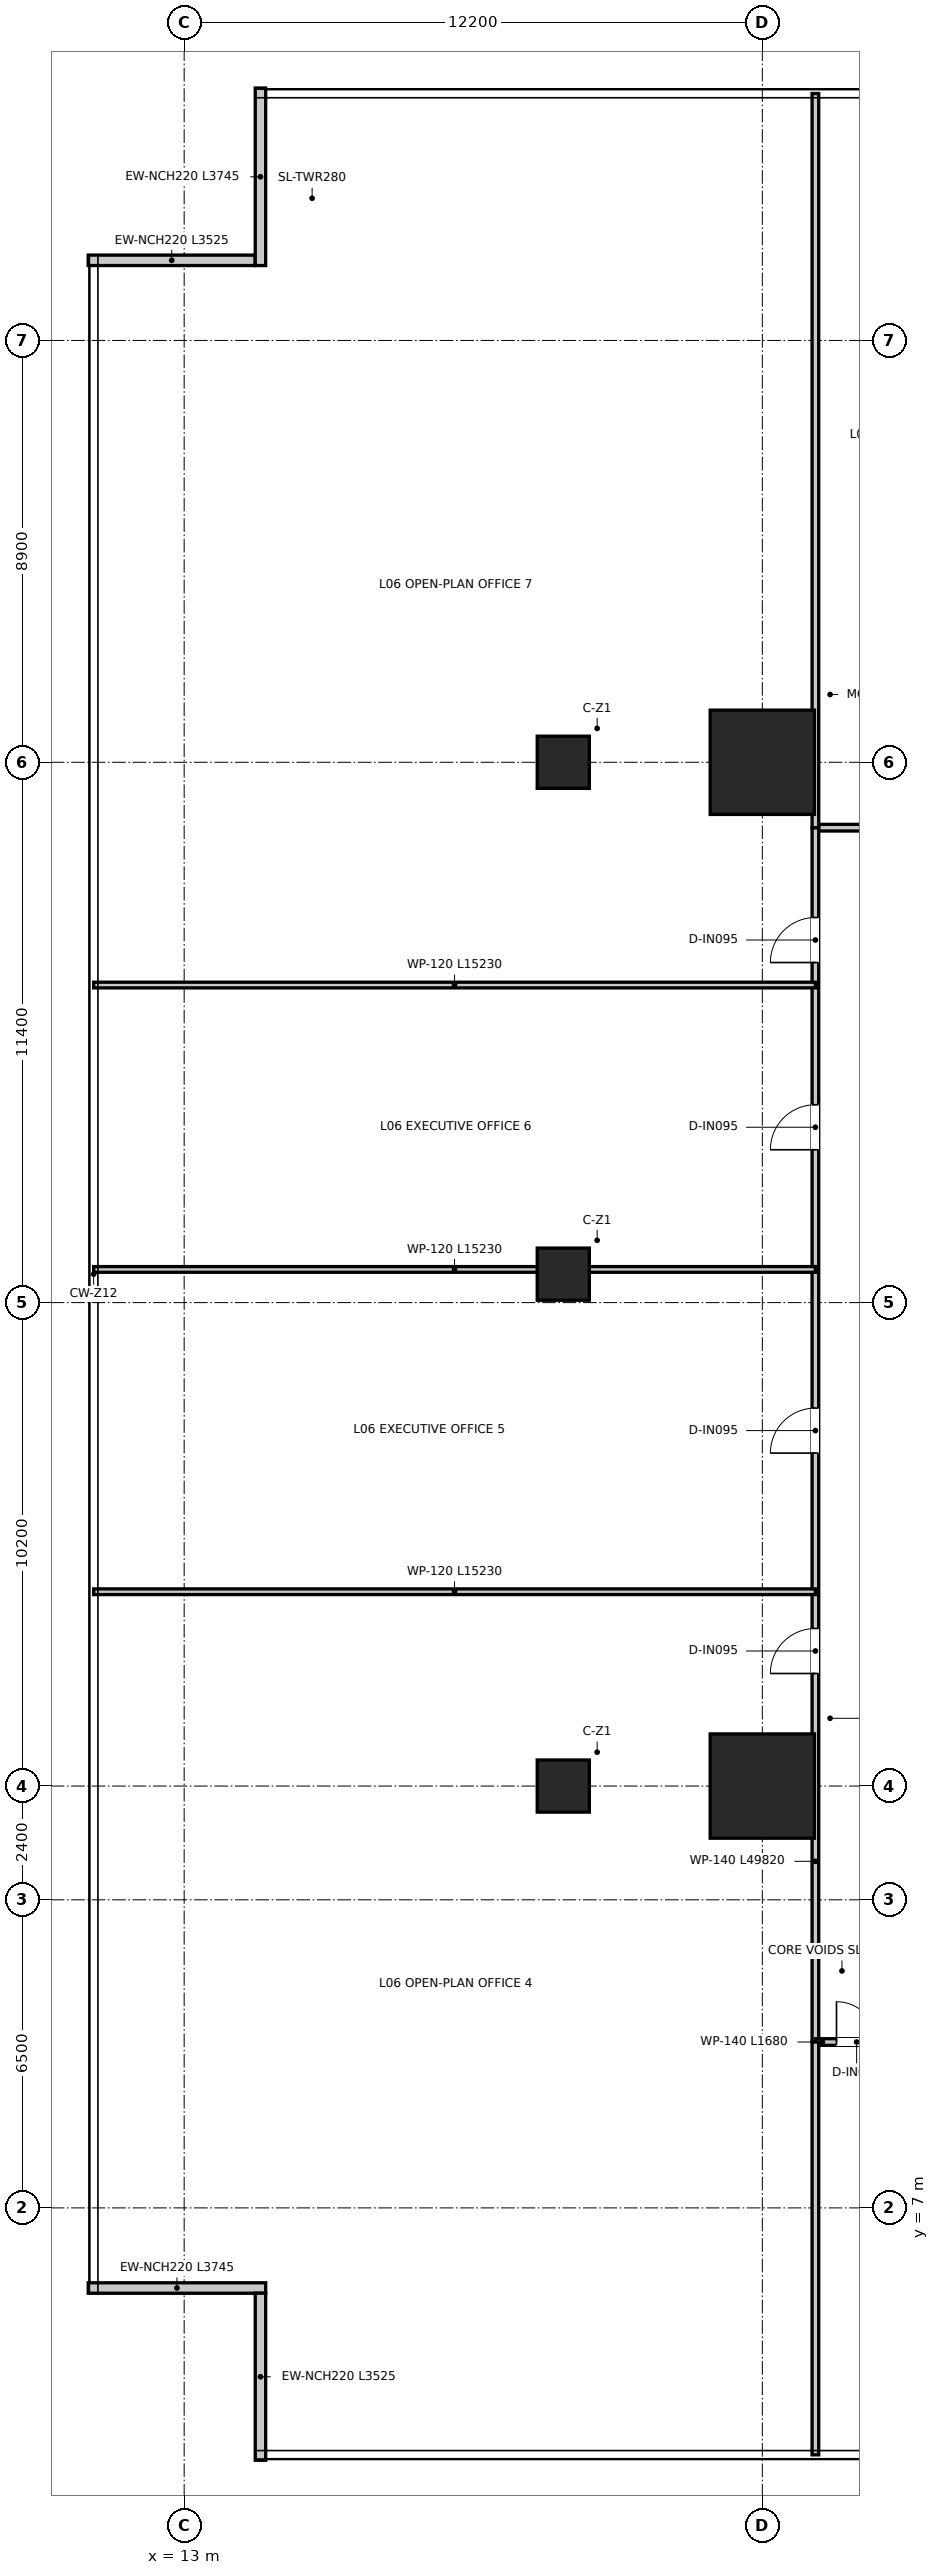
"""IFC4 building model, lengths in metres.
Left out: names, types, materials, properties, quantities, classifications, styles, units other than length and angle.
Written with IfcOpenShell. Run it as: python <this file> out.ifc"""

import sys

from ifc_helpers import new_model, si_unit, direction, frame, frame_2d, origin, origin_2d, place, context, subcontext, project, spatial, rectangle, extrude, source, transform, mapped, element, fill, save


model = new_model("IFC4")
c1 = context("Model", 3, precision=1e-05, world=origin(), true_north=direction((0.0, 1.0)))
c2 = subcontext(c1, "Body", "Model", "MODEL_VIEW")
j1 = project(units=[si_unit("LENGTHUNIT", "METRE"), si_unit("PLANEANGLEUNIT", "RADIAN")], contexts=[c1])
p1 = place(None, origin())
s1 = spatial("IfcSite", under=j1, at=p1, CompositionType="ELEMENT")
p2 = place(p1, origin())
s2 = spatial("IfcBuilding", under=s1, at=p2, CompositionType="ELEMENT")
p3 = place(p2, frame((0.0, 0.0, 28.95)))
s3 = spatial("IfcBuildingStorey", under=s2, at=p3, CompositionType="ELEMENT", Elevation=28.95)
m1 = source(origin(), c2, "Body", "SweptSolid", [
    extrude(rectangle(XDim=2.2, YDim=2.2, at=origin_2d()), origin(), (0.0, 0.0, 1.0), 3.95),
])
for number, where, z_axis, x_axis in (
    (1, (25.2, 15.9, 0.0), (0.0, 0.0, 1.0), (1.0, 0.0, 0.0)),
    (2, (25.2, 37.5, 0.0), (0.0, 0.0, 1.0), (1.0, 0.0, 0.0)),
):
    element("IfcColumn", number, at=place(p3, frame(where, z_axis=z_axis, x_axis=x_axis)), inside=s3, PredefinedType="USERDEFINED", context=c2, shape_type="MappedRepresentation", body=[
        mapped(m1, transform((0.0, 0.0, 0.0), x_axis=(1.0, 0.0, 0.0), y_axis=(0.0, 1.0, 0.0), z_axis=(0.0, 0.0, 1.0), scale=1.0)),
    ])
m2 = source(origin(), c2, "Body", "SweptSolid", [
    extrude(rectangle(XDim=1.1, YDim=1.1, at=origin_2d()), origin(), (0.0, 0.0, 1.0), 3.95),
])
for number, where, z_axis, x_axis in (
    (3, (21.0, 15.9, 0.0), (0.0, 0.0, 1.0), (1.0, 0.0, 0.0)),
    (4, (21.0, 26.7, 0.0), (0.0, 0.0, 1.0), (1.0, 0.0, 0.0)),
    (5, (21.0, 37.5, 0.0), (0.0, 0.0, 1.0), (1.0, 0.0, 0.0)),
):
    element("IfcColumn", number, at=place(p3, frame(where, z_axis=z_axis, x_axis=x_axis)), inside=s3, PredefinedType="COLUMN", context=c2, shape_type="MappedRepresentation", body=[
        mapped(m2, transform((0.0, 0.0, 0.0), x_axis=(1.0, 0.0, 0.0), y_axis=(0.0, 1.0, 0.0), z_axis=(0.0, 0.0, 1.0), scale=1.0)),
    ])
p4 = place(p3, frame((14.5, 48.09, 0.0), z_axis=(0.0, 0.0, 1.0), x_axis=(-1.0, 0.0, 0.0)))
e6 = element("IfcWall", 6, at=p4, inside=s3, PredefinedType="ELEMENTEDWALL", context=c2, shape_type="SweptSolid", body=[
    extrude(rectangle(XDim=3.525, YDim=0.22, at=frame_2d((1.762, 0.0))), origin(), (0.0, 0.0, 1.0), 3.67),
])
p5 = place(p3, frame((10.975, 5.31, 0.0), z_axis=(0.0, 0.0, 1.0), x_axis=(1.0, 0.0, 0.0)))
e7 = element("IfcWall", 7, at=p5, inside=s3, PredefinedType="ELEMENTEDWALL", context=c2, shape_type="SweptSolid", body=[
    extrude(rectangle(XDim=3.745, YDim=0.22, at=frame_2d((1.873, 0.0))), origin(), (0.0, 0.0, 1.0), 3.67),
])
p6 = place(p3, frame((14.61, 5.2, 0.0), z_axis=(0.0, 0.0, 1.0), x_axis=(0.0, -1.0, 0.0)))
e8 = element("IfcWall", 8, at=p6, inside=s3, PredefinedType="ELEMENTEDWALL", context=c2, shape_type="SweptSolid", body=[
    extrude(rectangle(XDim=3.525, YDim=0.22, at=frame_2d((1.762, 0.0))), origin(), (0.0, 0.0, 1.0), 3.67),
])
p7 = place(p3, frame((14.61, 51.725, 0.0), z_axis=(0.0, 0.0, 1.0), x_axis=(0.0, -1.0, 0.0)))
e9 = element("IfcWall", 9, at=p7, inside=s3, PredefinedType="ELEMENTEDWALL", context=c2, shape_type="SweptSolid", body=[
    extrude(rectangle(XDim=3.745, YDim=0.22, at=frame_2d((1.873, 0.0))), origin(), (0.0, 0.0, 1.0), 3.67),
])
p8 = place(p3, frame((26.32, 36.12, 0.0), z_axis=(0.0, 0.0, 1.0), x_axis=(1.0, 0.0, 0.0)))
e10 = element("IfcWall", 10, at=p8, inside=s3, PredefinedType="PARTITIONING", context=c2, shape_type="SweptSolid", body=[
    extrude(rectangle(XDim=19.36, YDim=0.14, at=frame_2d((9.68, 0.0))), origin(), (0.0, 0.0, 1.0), 3.08),
])
p9 = place(p8, frame((2.365, 0.0, 0.0)))
e11 = element("IfcOpeningElement", 11, at=p9, cuts=e10, PredefinedType="OPENING", context=c2, shape_type="SweptSolid", body=[
    extrude(rectangle(XDim=0.95, YDim=2.1, at=frame_2d((0.475, 1.05))), frame((0.0, 0.08, 0.0), z_axis=(0.0, -1.0, 0.0), x_axis=(1.0, 0.0, 0.0)), (0.0, 0.0, 1.0), 0.16),
])
p10 = place(p8, frame((9.205, 0.0, 0.0)))
e12 = element("IfcOpeningElement", 12, at=p10, cuts=e10, PredefinedType="OPENING", context=c2, shape_type="SweptSolid", body=[
    extrude(rectangle(XDim=0.95, YDim=2.1, at=frame_2d((0.475, 1.05))), frame((0.0, 0.08, 0.0), z_axis=(0.0, -1.0, 0.0), x_axis=(1.0, 0.0, 0.0)), (0.0, 0.0, 1.0), 0.16),
])
p11 = place(p8, frame((16.045, 0.0, 0.0)))
e13 = element("IfcOpeningElement", 13, at=p11, cuts=e10, PredefinedType="OPENING", context=c2, shape_type="SweptSolid", body=[
    extrude(rectangle(XDim=0.95, YDim=2.1, at=frame_2d((0.475, 1.05))), frame((0.0, 0.08, 0.0), z_axis=(0.0, -1.0, 0.0), x_axis=(1.0, 0.0, 0.0)), (0.0, 0.0, 1.0), 0.16),
])
p12 = place(p3, frame((26.32, 10.5, 0.0), z_axis=(0.0, 0.0, 1.0), x_axis=(0.0, 1.0, 0.0)))
e14 = element("IfcWall", 14, at=p12, inside=s3, PredefinedType="PARTITIONING", context=c2, shape_type="SweptSolid", body=[
    extrude(rectangle(XDim=25.62, YDim=0.14, at=frame_2d((12.81, 0.0))), origin(), (0.0, 0.0, 1.0), 2.97),
])
p13 = place(p12, frame((7.775, 0.0, 0.0)))
e15 = element("IfcOpeningElement", 15, at=p13, cuts=e14, PredefinedType="OPENING", context=c2, shape_type="SweptSolid", body=[
    extrude(rectangle(XDim=0.95, YDim=2.1, at=frame_2d((0.475, 1.05))), frame((0.0, 0.08, 0.0), z_axis=(0.0, -1.0, 0.0), x_axis=(1.0, 0.0, 0.0)), (0.0, 0.0, 1.0), 0.16),
])
p14 = place(p12, frame((12.425, 0.0, 0.0)))
e16 = element("IfcOpeningElement", 16, at=p14, cuts=e14, PredefinedType="OPENING", context=c2, shape_type="SweptSolid", body=[
    extrude(rectangle(XDim=0.95, YDim=2.1, at=frame_2d((0.475, 1.05))), frame((0.0, 0.08, 0.0), z_axis=(0.0, -1.0, 0.0), x_axis=(1.0, 0.0, 0.0)), (0.0, 0.0, 1.0), 0.16),
])
p15 = place(p12, frame((18.825, 0.0, 0.0)))
e17 = element("IfcOpeningElement", 17, at=p15, cuts=e14, PredefinedType="OPENING", context=c2, shape_type="SweptSolid", body=[
    extrude(rectangle(XDim=0.95, YDim=2.1, at=frame_2d((0.475, 1.05))), frame((0.0, 0.08, 0.0), z_axis=(0.0, -1.0, 0.0), x_axis=(1.0, 0.0, 0.0)), (0.0, 0.0, 1.0), 0.16),
])
p16 = place(p12, frame((22.775, 0.0, 0.0)))
e18 = element("IfcOpeningElement", 18, at=p16, cuts=e14, PredefinedType="OPENING", context=c2, shape_type="SweptSolid", body=[
    extrude(rectangle(XDim=0.95, YDim=2.1, at=frame_2d((0.475, 1.05))), frame((0.0, 0.08, 0.0), z_axis=(0.0, -1.0, 0.0), x_axis=(1.0, 0.0, 0.0)), (0.0, 0.0, 1.0), 0.16),
])
p17 = place(p3, frame((26.32, 10.5, 0.0), z_axis=(0.0, 0.0, 1.0), x_axis=(1.0, 0.0, 0.0)))
e19 = element("IfcWall", 19, at=p17, inside=s3, PredefinedType="PARTITIONING", context=c2, shape_type="SweptSolid", body=[
    extrude(rectangle(XDim=1.68, YDim=0.14, at=frame_2d((0.84, 0.0))), origin(), (0.0, 0.0, 1.0), 3.67),
])
p18 = place(p17, frame((0.445, 0.0, 0.0)))
e20 = element("IfcOpeningElement", 20, at=p18, cuts=e19, PredefinedType="OPENING", context=c2, shape_type="SweptSolid", body=[
    extrude(rectangle(XDim=0.85, YDim=2.1, at=frame_2d((0.425, 1.05))), frame((0.0, 0.08, 0.0), z_axis=(0.0, -1.0, 0.0), x_axis=(1.0, 0.0, 0.0)), (0.0, 0.0, 1.0), 0.16),
])
p19 = place(p3, frame((26.32, 36.12, 0.0), z_axis=(0.0, 0.0, 1.0), x_axis=(0.0, 1.0, 0.0)))
e21 = element("IfcWall", 21, at=p19, inside=s3, PredefinedType="PARTITIONING", context=c2, shape_type="SweptSolid", body=[
    extrude(rectangle(XDim=15.49, YDim=0.14, at=frame_2d((7.745, 0.0))), origin(), (0.0, 0.0, 1.0), 2.97),
])
p20 = place(p3, frame((26.32, 1.79, 0.0), z_axis=(0.0, 0.0, 1.0), x_axis=(0.0, 1.0, 0.0)))
e22 = element("IfcWall", 22, at=p20, inside=s3, PredefinedType="PARTITIONING", context=c2, shape_type="SweptSolid", body=[
    extrude(rectangle(XDim=8.71, YDim=0.14, at=frame_2d((4.355, 0.0))), origin(), (0.0, 0.0, 1.0), 3.67),
])
for number, where, z_axis, x_axis in (
    (23, (11.09, 20.0, 0.0), (0.0, 0.0, 1.0), (1.0, 0.0, 0.0)),
    (24, (11.09, 26.8, 0.0), (0.0, 0.0, 1.0), (1.0, 0.0, 0.0)),
    (25, (11.09, 32.8, 0.0), (0.0, 0.0, 1.0), (1.0, 0.0, 0.0)),
):
    element("IfcWall", number, at=place(p3, frame(where, z_axis=z_axis, x_axis=x_axis)), inside=s3, PredefinedType="PARTITIONING", context=c2, shape_type="SweptSolid", body=[
        extrude(rectangle(XDim=15.23, YDim=0.12, at=frame_2d((7.615, 0.0))), origin(), (0.0, 0.0, 1.0), 2.97),
    ])
p21 = place(p13, origin())
e26 = element("IfcDoor", 26, at=p21, inside=s3, OperationType="SINGLE_SWING_LEFT", PredefinedType="DOOR", context=c2, shape_type="SweptSolid", body=[
    extrude(rectangle(XDim=0.95, YDim=2.1, at=frame_2d((0.475, 1.05))), frame((0.0, 0.025, 0.0), z_axis=(0.0, -1.0, 0.0), x_axis=(1.0, 0.0, 0.0)), (0.0, 0.0, 1.0), 0.05),
])
fill(e15, e26)
p22 = place(p14, origin())
e27 = element("IfcDoor", 27, at=p22, inside=s3, OperationType="SINGLE_SWING_LEFT", PredefinedType="DOOR", context=c2, shape_type="SweptSolid", body=[
    extrude(rectangle(XDim=0.95, YDim=2.1, at=frame_2d((0.475, 1.05))), frame((0.0, 0.025, 0.0), z_axis=(0.0, -1.0, 0.0), x_axis=(1.0, 0.0, 0.0)), (0.0, 0.0, 1.0), 0.05),
])
fill(e16, e27)
p23 = place(p15, origin())
e28 = element("IfcDoor", 28, at=p23, inside=s3, OperationType="SINGLE_SWING_LEFT", PredefinedType="DOOR", context=c2, shape_type="SweptSolid", body=[
    extrude(rectangle(XDim=0.95, YDim=2.1, at=frame_2d((0.475, 1.05))), frame((0.0, 0.025, 0.0), z_axis=(0.0, -1.0, 0.0), x_axis=(1.0, 0.0, 0.0)), (0.0, 0.0, 1.0), 0.05),
])
fill(e17, e28)
p24 = place(p16, origin())
e29 = element("IfcDoor", 29, at=p24, inside=s3, OperationType="SINGLE_SWING_LEFT", PredefinedType="DOOR", context=c2, shape_type="SweptSolid", body=[
    extrude(rectangle(XDim=0.95, YDim=2.1, at=frame_2d((0.475, 1.05))), frame((0.0, 0.025, 0.0), z_axis=(0.0, -1.0, 0.0), x_axis=(1.0, 0.0, 0.0)), (0.0, 0.0, 1.0), 0.05),
])
fill(e18, e29)
p25 = place(p18, origin())
e30 = element("IfcDoor", 30, at=p25, inside=s3, OperationType="SINGLE_SWING_LEFT", PredefinedType="DOOR", context=c2, shape_type="SweptSolid", body=[
    extrude(rectangle(XDim=0.85, YDim=2.1, at=frame_2d((0.425, 1.05))), frame((0.0, 0.025, 0.0), z_axis=(0.0, -1.0, 0.0), x_axis=(1.0, 0.0, 0.0)), (0.0, 0.0, 1.0), 0.05),
])
fill(e20, e30)
save(model, sys.argv[1])
